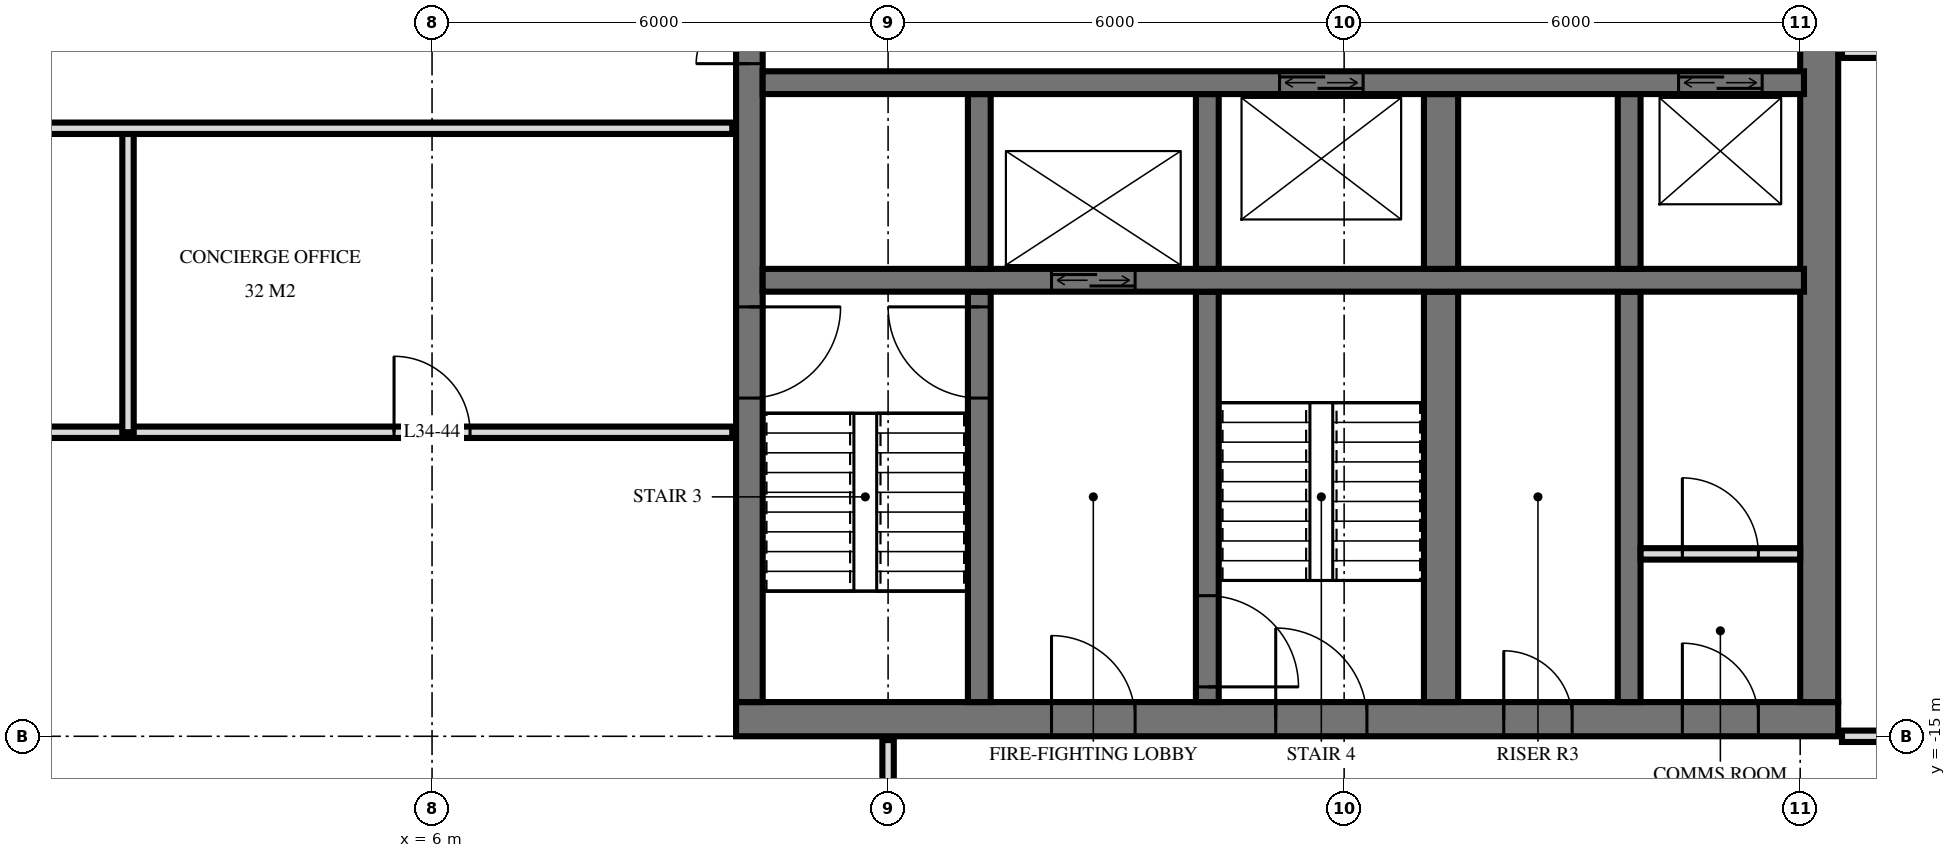
"""IFC4 building model, lengths in metres.
Left out: names, types, materials, properties, quantities, classifications, styles, units other than length and angle.
Written with IfcOpenShell. Run it as: python <this file> out.ifc"""

import sys

from ifc_helpers import new_model, si_unit, direction, frame, frame_2d, origin, place, context, subcontext, project, spatial, rectangle, extrude, element, fill, save


model = new_model("IFC4")
c1 = context("Model", 3, precision=1e-05, world=origin(), true_north=direction((0.0, 1.0)))
c2 = subcontext(c1, "Body", "Model", "MODEL_VIEW")
j1 = project(units=[si_unit("LENGTHUNIT", "METRE"), si_unit("PLANEANGLEUNIT", "RADIAN")], contexts=[c1])
p1 = place(None, origin())
s1 = spatial("IfcSite", under=j1, at=p1, CompositionType="ELEMENT")
p2 = place(p1, origin())
s2 = spatial("IfcBuilding", under=s1, at=p2, CompositionType="ELEMENT")
p3 = place(p2, frame((0.0, 0.0, 134.4)))
s3 = spatial("IfcBuildingStorey", under=s2, at=p3, CompositionType="ELEMENT", Elevation=134.4)
p4 = place(p3, frame((10.0, -14.775, 0.0), z_axis=(0.0, 0.0, 1.0), x_axis=(1.0, 0.0, 0.0)))
e1 = element("IfcWall", 1, at=p4, inside=s3, PredefinedType="SHEAR", context=c2, shape_type="SweptSolid", body=[
    extrude(rectangle(XDim=14.5, YDim=0.45, at=frame_2d((7.25, 0.0))), origin(), (0.0, 0.0, 1.0), 3.6),
])
p5 = place(p4, frame((7.1, 0.0, 0.0)))
e2 = element("IfcOpeningElement", 2, at=p5, cuts=e1, PredefinedType="OPENING", context=c2, shape_type="SweptSolid", body=[
    extrude(rectangle(XDim=1.2, YDim=2.1, at=frame_2d((0.6, 1.05))), frame((0.0, 0.235, 0.0), z_axis=(0.0, -1.0, 0.0), x_axis=(1.0, 0.0, 0.0)), (0.0, 0.0, 1.0), 0.47),
])
p6 = place(p4, frame((4.15, 0.0, 0.0)))
e3 = element("IfcOpeningElement", 3, at=p6, cuts=e1, PredefinedType="OPENING", context=c2, shape_type="SweptSolid", body=[
    extrude(rectangle(XDim=1.1, YDim=2.1, at=frame_2d((0.55, 1.05))), frame((0.0, 0.235, 0.0), z_axis=(0.0, -1.0, 0.0), x_axis=(1.0, 0.0, 0.0)), (0.0, 0.0, 1.0), 0.47),
])
p7 = place(p4, frame((10.1, 0.0, 0.0)))
e4 = element("IfcOpeningElement", 4, at=p7, cuts=e1, PredefinedType="OPENING", context=c2, shape_type="SweptSolid", body=[
    extrude(rectangle(XDim=0.9, YDim=2.1, at=frame_2d((0.45, 1.05))), frame((0.0, 0.235, 0.0), z_axis=(0.0, -1.0, 0.0), x_axis=(1.0, 0.0, 0.0)), (0.0, 0.0, 1.0), 0.47),
])
p8 = place(p4, frame((12.45, 0.0, 0.0)))
e5 = element("IfcOpeningElement", 5, at=p8, cuts=e1, PredefinedType="OPENING", context=c2, shape_type="SweptSolid", body=[
    extrude(rectangle(XDim=1.0, YDim=2.1, at=frame_2d((0.5, 1.05))), frame((0.0, 0.235, 0.0), z_axis=(0.0, -1.0, 0.0), x_axis=(1.0, 0.0, 0.0)), (0.0, 0.0, 1.0), 0.47),
])
p9 = place(p3, frame((10.175, -14.55, 0.0), z_axis=(0.0, 0.0, 1.0), x_axis=(0.0, 1.0, 0.0)))
e6 = element("IfcWall", 6, at=p9, inside=s3, PredefinedType="SHEAR", context=c2, shape_type="SweptSolid", body=[
    extrude(rectangle(XDim=14.1, YDim=0.35, at=frame_2d((7.05, 0.0))), origin(), (0.0, 0.0, 1.0), 3.6),
])
p10 = place(p9, frame((8.4, 0.0, 0.0)))
e7 = element("IfcOpeningElement", 7, at=p10, cuts=e6, PredefinedType="OPENING", context=c2, shape_type="SweptSolid", body=[
    extrude(rectangle(XDim=1.4, YDim=2.4, at=frame_2d((0.7, 1.2))), frame((0.0, 0.185, 0.0), z_axis=(0.0, -1.0, 0.0), x_axis=(1.0, 0.0, 0.0)), (0.0, 0.0, 1.0), 0.37),
])
p11 = place(p9, frame((10.0, 0.0, 0.0)))
e8 = element("IfcOpeningElement", 8, at=p11, cuts=e6, PredefinedType="OPENING", context=c2, shape_type="SweptSolid", body=[
    extrude(rectangle(XDim=1.4, YDim=2.4, at=frame_2d((0.7, 1.2))), frame((0.0, 0.185, 0.0), z_axis=(0.0, -1.0, 0.0), x_axis=(1.0, 0.0, 0.0)), (0.0, 0.0, 1.0), 0.37),
])
p12 = place(p9, frame((4.0, 0.0, 0.0)))
e9 = element("IfcOpeningElement", 9, at=p12, cuts=e6, PredefinedType="OPENING", context=c2, shape_type="SweptSolid", body=[
    extrude(rectangle(XDim=1.2, YDim=2.1, at=frame_2d((0.6, 1.05))), frame((0.0, 0.185, 0.0), z_axis=(0.0, -1.0, 0.0), x_axis=(1.0, 0.0, 0.0)), (0.0, 0.0, 1.0), 0.37),
])
p13 = place(p3, frame((24.25, -14.55, 0.0), z_axis=(0.0, 0.0, 1.0), x_axis=(0.0, 1.0, 0.0)))
e10 = element("IfcWall", 10, at=p13, inside=s3, PredefinedType="SHEAR", context=c2, shape_type="SweptSolid", body=[
    extrude(rectangle(XDim=14.1, YDim=0.5, at=frame_2d((7.05, 0.0))), origin(), (0.0, 0.0, 1.0), 3.6),
])
p14 = place(p3, frame((10.35, -6.4, 0.0), z_axis=(0.0, 0.0, 1.0), x_axis=(1.0, 0.0, 0.0)))
e11 = element("IfcWall", 11, at=p14, inside=s3, PredefinedType="SHEAR", context=c2, shape_type="SweptSolid", body=[
    extrude(rectangle(XDim=13.7, YDim=0.3, at=frame_2d((6.85, 0.0))), origin(), (0.0, 0.0, 1.0), 3.6),
])
p15 = place(p14, frame((12.05, 0.0, 0.0)))
e12 = element("IfcOpeningElement", 12, at=p15, cuts=e11, PredefinedType="OPENING", context=c2, shape_type="SweptSolid", body=[
    extrude(rectangle(XDim=1.1, YDim=2.1, at=frame_2d((0.55, 1.05))), frame((0.0, 0.16, 0.0), z_axis=(0.0, -1.0, 0.0), x_axis=(1.0, 0.0, 0.0)), (0.0, 0.0, 1.0), 0.32),
])
p16 = place(p14, frame((6.8, 0.0, 0.0)))
e13 = element("IfcOpeningElement", 13, at=p16, cuts=e11, PredefinedType="OPENING", context=c2, shape_type="SweptSolid", body=[
    extrude(rectangle(XDim=1.1, YDim=2.1, at=frame_2d((0.55, 1.05))), frame((0.0, 0.16, 0.0), z_axis=(0.0, -1.0, 0.0), x_axis=(1.0, 0.0, 0.0)), (0.0, 0.0, 1.0), 0.32),
])
p17 = place(p3, frame((10.35, -9.0, 0.0), z_axis=(0.0, 0.0, 1.0), x_axis=(1.0, 0.0, 0.0)))
e14 = element("IfcWall", 14, at=p17, inside=s3, PredefinedType="SHEAR", context=c2, shape_type="SweptSolid", body=[
    extrude(rectangle(XDim=13.7, YDim=0.3, at=frame_2d((6.85, 0.0))), origin(), (0.0, 0.0, 1.0), 3.6),
])
p18 = place(p17, frame((3.8, 0.0, 0.0)))
e15 = element("IfcOpeningElement", 15, at=p18, cuts=e14, PredefinedType="OPENING", context=c2, shape_type="SweptSolid", body=[
    extrude(rectangle(XDim=1.1, YDim=2.1, at=frame_2d((0.55, 1.05))), frame((0.0, 0.16, 0.0), z_axis=(0.0, -1.0, 0.0), x_axis=(1.0, 0.0, 0.0)), (0.0, 0.0, 1.0), 0.32),
])
p19 = place(p3, frame((13.2, -8.85, 0.0), z_axis=(0.0, 0.0, 1.0), x_axis=(0.0, 1.0, 0.0)))
e16 = element("IfcWall", 16, at=p19, inside=s3, PredefinedType="SHEAR", context=c2, shape_type="SweptSolid", body=[
    extrude(rectangle(XDim=2.3, YDim=0.3, at=frame_2d((1.15, 0.0))), origin(), (0.0, 0.0, 1.0), 3.6),
])
p20 = place(p3, frame((13.2, -14.55, 0.0), z_axis=(0.0, 0.0, 1.0), x_axis=(0.0, 1.0, 0.0)))
e17 = element("IfcWall", 17, at=p20, inside=s3, PredefinedType="SHEAR", context=c2, shape_type="SweptSolid", body=[
    extrude(rectangle(XDim=5.4, YDim=0.3, at=frame_2d((2.7, 0.0))), origin(), (0.0, 0.0, 1.0), 3.6),
])
p21 = place(p20, frame((4.0, 0.0, 0.0)))
e18 = element("IfcOpeningElement", 18, at=p21, cuts=e17, PredefinedType="OPENING", context=c2, shape_type="SweptSolid", body=[
    extrude(rectangle(XDim=1.2, YDim=2.1, at=frame_2d((0.6, 1.05))), frame((0.0, 0.16, 0.0), z_axis=(0.0, -1.0, 0.0), x_axis=(1.0, 0.0, 0.0)), (0.0, 0.0, 1.0), 0.32),
])
p22 = place(p3, frame((16.2, -8.85, 0.0), z_axis=(0.0, 0.0, 1.0), x_axis=(0.0, 1.0, 0.0)))
e19 = element("IfcWall", 19, at=p22, inside=s3, PredefinedType="SHEAR", context=c2, shape_type="SweptSolid", body=[
    extrude(rectangle(XDim=2.3, YDim=0.3, at=frame_2d((1.15, 0.0))), origin(), (0.0, 0.0, 1.0), 3.6),
])
p23 = place(p3, frame((16.2, -14.55, 0.0), z_axis=(0.0, 0.0, 1.0), x_axis=(0.0, 1.0, 0.0)))
e20 = element("IfcWall", 20, at=p23, inside=s3, PredefinedType="SHEAR", context=c2, shape_type="SweptSolid", body=[
    extrude(rectangle(XDim=5.4, YDim=0.3, at=frame_2d((2.7, 0.0))), origin(), (0.0, 0.0, 1.0), 3.6),
])
p24 = place(p23, frame((0.2, 0.0, 0.0)))
e21 = element("IfcOpeningElement", 21, at=p24, cuts=e20, PredefinedType="OPENING", context=c2, shape_type="SweptSolid", body=[
    extrude(rectangle(XDim=1.2, YDim=2.1, at=frame_2d((0.6, 1.05))), frame((0.0, 0.16, 0.0), z_axis=(0.0, -1.0, 0.0), x_axis=(1.0, 0.0, 0.0)), (0.0, 0.0, 1.0), 0.32),
])
p25 = place(p3, frame((19.275, -8.85, 0.0), z_axis=(0.0, 0.0, 1.0), x_axis=(0.0, 1.0, 0.0)))
e22 = element("IfcWall", 22, at=p25, inside=s3, PredefinedType="SHEAR", context=c2, shape_type="SweptSolid", body=[
    extrude(rectangle(XDim=2.3, YDim=0.45, at=frame_2d((1.15, 0.0))), origin(), (0.0, 0.0, 1.0), 3.6),
])
p26 = place(p3, frame((19.275, -14.55, 0.0), z_axis=(0.0, 0.0, 1.0), x_axis=(0.0, 1.0, 0.0)))
e23 = element("IfcWall", 23, at=p26, inside=s3, PredefinedType="SHEAR", context=c2, shape_type="SweptSolid", body=[
    extrude(rectangle(XDim=5.4, YDim=0.45, at=frame_2d((2.7, 0.0))), origin(), (0.0, 0.0, 1.0), 3.6),
])
p27 = place(p3, frame((21.75, -8.85, 0.0), z_axis=(0.0, 0.0, 1.0), x_axis=(0.0, 1.0, 0.0)))
e24 = element("IfcWall", 24, at=p27, inside=s3, PredefinedType="SHEAR", context=c2, shape_type="SweptSolid", body=[
    extrude(rectangle(XDim=2.3, YDim=0.3, at=frame_2d((1.15, 0.0))), origin(), (0.0, 0.0, 1.0), 3.6),
])
p28 = place(p3, frame((21.75, -14.55, 0.0), z_axis=(0.0, 0.0, 1.0), x_axis=(0.0, 1.0, 0.0)))
e25 = element("IfcWall", 25, at=p28, inside=s3, PredefinedType="SHEAR", context=c2, shape_type="SweptSolid", body=[
    extrude(rectangle(XDim=5.4, YDim=0.3, at=frame_2d((2.7, 0.0))), origin(), (0.0, 0.0, 1.0), 3.6),
])
p29 = place(p3, frame((21.9, -12.6, 0.0), z_axis=(0.0, 0.0, 1.0), x_axis=(1.0, 0.0, 0.0)))
e26 = element("IfcWall", 26, at=p29, inside=s3, PredefinedType="PARTITIONING", context=c2, shape_type="SweptSolid", body=[
    extrude(rectangle(XDim=2.1, YDim=0.15, at=frame_2d((1.05, 0.0))), origin(), (0.0, 0.0, 1.0), 3.3),
])
p30 = place(p29, frame((0.55, 0.0, 0.0)))
e27 = element("IfcOpeningElement", 27, at=p30, cuts=e26, PredefinedType="OPENING", context=c2, shape_type="SweptSolid", body=[
    extrude(rectangle(XDim=1.0, YDim=2.1, at=frame_2d((0.5, 1.05))), frame((0.0, 0.085, 0.0), z_axis=(0.0, -1.0, 0.0), x_axis=(1.0, 0.0, 0.0)), (0.0, 0.0, 1.0), 0.17),
])
p31 = place(p3, frame((12.0, -17.4, 0.0), z_axis=(0.0, 0.0, 1.0), x_axis=(0.0, 1.0, 0.0)))
e28 = element("IfcWall", 28, at=p31, inside=s3, PredefinedType="PARTITIONING", context=c2, shape_type="SweptSolid", body=[
    extrude(rectangle(XDim=2.35, YDim=0.15, at=frame_2d((1.175, 0.0))), origin(), (0.0, 0.0, 1.0), 3.32),
])
p32 = place(p31, frame((0.7, 0.0, 0.0)))
e29 = element("IfcOpeningElement", 29, at=p32, cuts=e28, PredefinedType="OPENING", context=c2, shape_type="SweptSolid", body=[
    extrude(rectangle(XDim=1.0, YDim=2.1, at=frame_2d((0.5, 1.05))), frame((0.0, 0.085, 0.0), z_axis=(0.0, -1.0, 0.0), x_axis=(1.0, 0.0, 0.0)), (0.0, 0.0, 1.0), 0.17),
])
p33 = place(p3, frame((2.0, -11.0, 0.0), z_axis=(0.0, 0.0, 1.0), x_axis=(0.0, 1.0, 0.0)))
e30 = element("IfcWall", 30, at=p33, inside=s3, PredefinedType="PARTITIONING", context=c2, shape_type="SweptSolid", body=[
    extrude(rectangle(XDim=4.0, YDim=0.15, at=frame_2d((2.0, 0.0))), origin(), (0.0, 0.0, 1.0), 3.32),
])
p34 = place(p3, frame((24.55, -15.0, 0.0), z_axis=(0.0, 0.0, 1.0), x_axis=(1.0, 0.0, 0.0)))
e31 = element("IfcWall", 31, at=p34, inside=s3, PredefinedType="PARTITIONING", context=c2, shape_type="SweptSolid", body=[
    extrude(rectangle(XDim=3.47, YDim=0.15, at=frame_2d((1.735, 0.0))), origin(), (0.0, 0.0, 1.0), 3.32),
])
p35 = place(p34, frame((0.9, 0.0, 0.0)))
e32 = element("IfcOpeningElement", 32, at=p35, cuts=e31, PredefinedType="OPENING", context=c2, shape_type="SweptSolid", body=[
    extrude(rectangle(XDim=1.0, YDim=2.1, at=frame_2d((0.5, 1.05))), frame((0.0, 0.085, 0.0), z_axis=(0.0, -1.0, 0.0), x_axis=(1.0, 0.0, 0.0)), (0.0, 0.0, 1.0), 0.17),
])
p36 = place(p3, frame((-9.95, -11.0, 0.0), z_axis=(0.0, 0.0, 1.0), x_axis=(1.0, 0.0, 0.0)))
e33 = element("IfcWall", 33, at=p36, inside=s3, PredefinedType="PARTITIONING", context=c2, shape_type="SweptSolid", body=[
    extrude(rectangle(XDim=19.9, YDim=0.15, at=frame_2d((9.95, 0.0))), origin(), (0.0, 0.0, 1.0), 3.32),
])
p37 = place(p36, frame((9.45, 0.0, 0.0)))
e34 = element("IfcOpeningElement", 34, at=p37, cuts=e33, PredefinedType="OPENING", context=c2, shape_type="SweptSolid", body=[
    extrude(rectangle(XDim=1.0, YDim=2.1, at=frame_2d((0.5, 1.05))), frame((0.0, 0.085, 0.0), z_axis=(0.0, -1.0, 0.0), x_axis=(1.0, 0.0, 0.0)), (0.0, 0.0, 1.0), 0.17),
])
p38 = place(p36, frame((15.45, 0.0, 0.0)))
e35 = element("IfcOpeningElement", 35, at=p38, cuts=e33, PredefinedType="OPENING", context=c2, shape_type="SweptSolid", body=[
    extrude(rectangle(XDim=1.0, YDim=2.1, at=frame_2d((0.5, 1.05))), frame((0.0, 0.085, 0.0), z_axis=(0.0, -1.0, 0.0), x_axis=(1.0, 0.0, 0.0)), (0.0, 0.0, 1.0), 0.17),
])
p39 = place(p3, frame((-9.95, -7.0, 0.0), z_axis=(0.0, 0.0, 1.0), x_axis=(1.0, 0.0, 0.0)))
e36 = element("IfcWall", 36, at=p39, inside=s3, PredefinedType="PARTITIONING", context=c2, shape_type="SweptSolid", body=[
    extrude(rectangle(XDim=19.9, YDim=0.15, at=frame_2d((9.95, 0.0))), origin(), (0.0, 0.0, 1.0), 3.32),
])
p40 = place(p39, frame((9.45, 0.0, 0.0)))
e37 = element("IfcOpeningElement", 37, at=p40, cuts=e36, PredefinedType="OPENING", context=c2, shape_type="SweptSolid", body=[
    extrude(rectangle(XDim=1.0, YDim=2.1, at=frame_2d((0.5, 1.05))), frame((0.0, 0.085, 0.0), z_axis=(0.0, -1.0, 0.0), x_axis=(1.0, 0.0, 0.0)), (0.0, 0.0, 1.0), 0.17),
])
p41 = place(p39, frame((3.45, 0.0, 0.0)))
e38 = element("IfcOpeningElement", 38, at=p41, cuts=e36, PredefinedType="OPENING", context=c2, shape_type="SweptSolid", body=[
    extrude(rectangle(XDim=1.0, YDim=2.1, at=frame_2d((0.5, 1.05))), frame((0.0, 0.085, 0.0), z_axis=(0.0, -1.0, 0.0), x_axis=(1.0, 0.0, 0.0)), (0.0, 0.0, 1.0), 0.17),
])
p42 = place(p3, frame((24.55, -6.0, 0.0), z_axis=(0.0, 0.0, 1.0), x_axis=(1.0, 0.0, 0.0)))
e39 = element("IfcWall", 39, at=p42, inside=s3, PredefinedType="PARTITIONING", context=c2, shape_type="SweptSolid", body=[
    extrude(rectangle(XDim=3.47, YDim=0.15, at=frame_2d((1.735, 0.0))), origin(), (0.0, 0.0, 1.0), 3.32),
])
p43 = place(p42, frame((1.35, 0.0, 0.0)))
e40 = element("IfcOpeningElement", 40, at=p43, cuts=e39, PredefinedType="OPENING", context=c2, shape_type="SweptSolid", body=[
    extrude(rectangle(XDim=0.9, YDim=2.1, at=frame_2d((0.45, 1.05))), frame((0.0, 0.085, 0.0), z_axis=(0.0, -1.0, 0.0), x_axis=(1.0, 0.0, 0.0)), (0.0, 0.0, 1.0), 0.17),
])
p44 = place(p15, origin())
e41 = element("IfcDoor", 41, at=p44, inside=s3, OperationType="DOUBLE_DOOR_SLIDING", PredefinedType="USERDEFINED", context=c2, shape_type="SweptSolid", body=[
    extrude(rectangle(XDim=1.1, YDim=2.1, at=frame_2d((0.55, 1.05))), frame((0.0, 0.025, 0.0), z_axis=(0.0, -1.0, 0.0), x_axis=(1.0, 0.0, 0.0)), (0.0, 0.0, 1.0), 0.05),
])
fill(e12, e41)
p45 = place(p18, origin())
e42 = element("IfcDoor", 42, at=p45, inside=s3, OperationType="DOUBLE_DOOR_SLIDING", PredefinedType="USERDEFINED", context=c2, shape_type="SweptSolid", body=[
    extrude(rectangle(XDim=1.1, YDim=2.1, at=frame_2d((0.55, 1.05))), frame((0.0, 0.025, 0.0), z_axis=(0.0, -1.0, 0.0), x_axis=(1.0, 0.0, 0.0)), (0.0, 0.0, 1.0), 0.05),
])
fill(e15, e42)
p46 = place(p16, origin())
e43 = element("IfcDoor", 43, at=p46, inside=s3, OperationType="DOUBLE_DOOR_SLIDING", PredefinedType="USERDEFINED", context=c2, shape_type="SweptSolid", body=[
    extrude(rectangle(XDim=1.1, YDim=2.1, at=frame_2d((0.55, 1.05))), frame((0.0, 0.025, 0.0), z_axis=(0.0, -1.0, 0.0), x_axis=(1.0, 0.0, 0.0)), (0.0, 0.0, 1.0), 0.05),
])
fill(e13, e43)
p47 = place(p10, origin())
e44 = element("IfcDoor", 44, at=p47, inside=s3, OperationType="DOUBLE_DOOR_SINGLE_SWING", PredefinedType="DOOR", context=c2, shape_type="SweptSolid", body=[
    extrude(rectangle(XDim=1.4, YDim=2.4, at=frame_2d((0.7, 1.2))), frame((0.0, 0.025, 0.0), z_axis=(0.0, -1.0, 0.0), x_axis=(1.0, 0.0, 0.0)), (0.0, 0.0, 1.0), 0.05),
])
fill(e7, e44)
p48 = place(p12, frame((0.6, 0.0, 0.0), z_axis=(0.0, 0.0, 1.0), x_axis=(-1.0, 0.0, 0.0)))
e45 = element("IfcDoor", 45, at=p48, inside=s3, OperationType="SINGLE_SWING_RIGHT", PredefinedType="DOOR", context=c2, shape_type="SweptSolid", body=[
    extrude(rectangle(XDim=1.2, YDim=2.1, at=frame_2d((0.0, 1.05))), frame((0.0, -0.025, 0.0), z_axis=(0.0, 1.0, 0.0), x_axis=(-1.0, 0.0, 0.0)), (0.0, 0.0, 1.0), 0.05),
])
fill(e9, e45)
p49 = place(p5, origin())
e46 = element("IfcDoor", 46, at=p49, inside=s3, OperationType="SINGLE_SWING_RIGHT", PredefinedType="DOOR", context=c2, shape_type="SweptSolid", body=[
    extrude(rectangle(XDim=1.2, YDim=2.1, at=frame_2d((0.6, 1.05))), frame((0.0, 0.025, 0.0), z_axis=(0.0, -1.0, 0.0), x_axis=(1.0, 0.0, 0.0)), (0.0, 0.0, 1.0), 0.05),
])
fill(e2, e46)
p50 = place(p6, origin())
e47 = element("IfcDoor", 47, at=p50, inside=s3, OperationType="SINGLE_SWING_RIGHT", PredefinedType="DOOR", context=c2, shape_type="SweptSolid", body=[
    extrude(rectangle(XDim=1.1, YDim=2.1, at=frame_2d((0.55, 1.05))), frame((0.0, 0.025, 0.0), z_axis=(0.0, -1.0, 0.0), x_axis=(1.0, 0.0, 0.0)), (0.0, 0.0, 1.0), 0.05),
])
fill(e3, e47)
p51 = place(p7, origin())
e48 = element("IfcDoor", 48, at=p51, inside=s3, OperationType="SINGLE_SWING_RIGHT", PredefinedType="DOOR", context=c2, shape_type="SweptSolid", body=[
    extrude(rectangle(XDim=0.9, YDim=2.1, at=frame_2d((0.45, 1.05))), frame((0.0, 0.025, 0.0), z_axis=(0.0, -1.0, 0.0), x_axis=(1.0, 0.0, 0.0)), (0.0, 0.0, 1.0), 0.05),
])
fill(e4, e48)
p52 = place(p8, origin())
e49 = element("IfcDoor", 49, at=p52, inside=s3, OperationType="SINGLE_SWING_RIGHT", PredefinedType="DOOR", context=c2, shape_type="SweptSolid", body=[
    extrude(rectangle(XDim=1.0, YDim=2.1, at=frame_2d((0.5, 1.05))), frame((0.0, 0.025, 0.0), z_axis=(0.0, -1.0, 0.0), x_axis=(1.0, 0.0, 0.0)), (0.0, 0.0, 1.0), 0.05),
])
fill(e5, e49)
p53 = place(p21, origin())
e50 = element("IfcDoor", 50, at=p53, inside=s3, OperationType="SINGLE_SWING_LEFT", PredefinedType="DOOR", context=c2, shape_type="SweptSolid", body=[
    extrude(rectangle(XDim=1.2, YDim=2.1, at=frame_2d((0.6, 1.05))), frame((0.0, 0.025, 0.0), z_axis=(0.0, -1.0, 0.0), x_axis=(1.0, 0.0, 0.0)), (0.0, 0.0, 1.0), 0.05),
])
fill(e18, e50)
p54 = place(p24, frame((0.6, 0.0, 0.0), z_axis=(0.0, 0.0, 1.0), x_axis=(-1.0, 0.0, 0.0)))
e51 = element("IfcDoor", 51, at=p54, inside=s3, OperationType="SINGLE_SWING_LEFT", PredefinedType="DOOR", context=c2, shape_type="SweptSolid", body=[
    extrude(rectangle(XDim=1.2, YDim=2.1, at=frame_2d((0.0, 1.05))), frame((0.0, -0.025, 0.0), z_axis=(0.0, 1.0, 0.0), x_axis=(-1.0, 0.0, 0.0)), (0.0, 0.0, 1.0), 0.05),
])
fill(e21, e51)
p55 = place(p30, origin())
e52 = element("IfcDoor", 52, at=p55, inside=s3, OperationType="SINGLE_SWING_RIGHT", PredefinedType="DOOR", context=c2, shape_type="SweptSolid", body=[
    extrude(rectangle(XDim=1.0, YDim=2.1, at=frame_2d((0.5, 1.05))), frame((0.0, 0.025, 0.0), z_axis=(0.0, -1.0, 0.0), x_axis=(1.0, 0.0, 0.0)), (0.0, 0.0, 1.0), 0.05),
])
fill(e27, e52)
p56 = place(p38, origin())
e53 = element("IfcDoor", 53, at=p56, inside=s3, OperationType="SINGLE_SWING_RIGHT", PredefinedType="DOOR", context=c2, shape_type="SweptSolid", body=[
    extrude(rectangle(XDim=1.0, YDim=2.1, at=frame_2d((0.5, 1.05))), frame((0.0, 0.025, 0.0), z_axis=(0.0, -1.0, 0.0), x_axis=(1.0, 0.0, 0.0)), (0.0, 0.0, 1.0), 0.05),
])
fill(e35, e53)
save(model, sys.argv[1])
